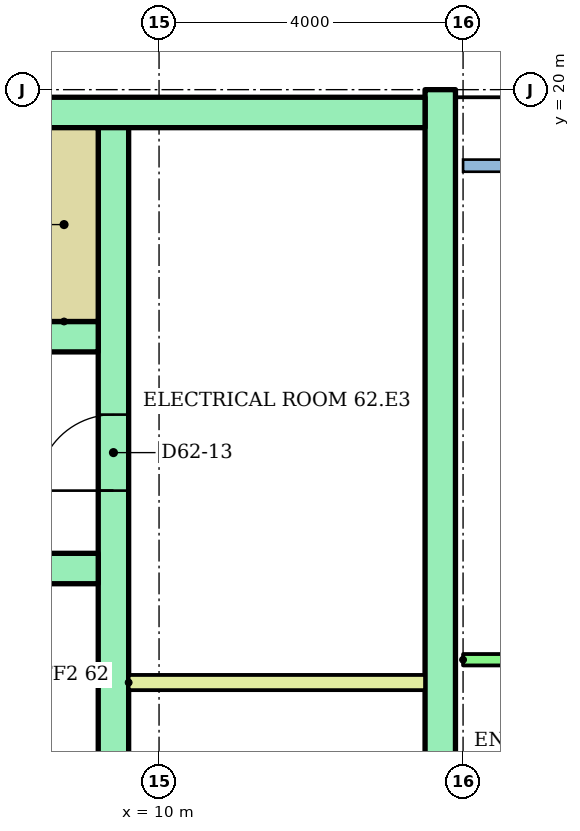
"""IFC4 building model, lengths in metres.
Left out: names, types, materials, properties, quantities, classifications, styles, units other than length and angle.
Written with IfcOpenShell. Run it as: python <this file> out.ifc"""

import sys

from ifc_helpers import new_model, si_unit, direction, frame, frame_2d, origin, place, context, subcontext, project, spatial, rectangle, extrude, element, fill, save


model = new_model("IFC4")
c1 = context("Model", 3, precision=1e-05, world=origin(), true_north=direction((0.0, 1.0)))
c2 = subcontext(c1, "Body", "Model", "MODEL_VIEW")
j1 = project(units=[si_unit("LENGTHUNIT", "METRE"), si_unit("PLANEANGLEUNIT", "RADIAN")], contexts=[c1])
p1 = place(None, origin())
s1 = spatial("IfcSite", under=j1, at=p1, CompositionType="ELEMENT")
p2 = place(p1, origin())
s2 = spatial("IfcBuilding", under=s1, at=p2, CompositionType="ELEMENT")
p3 = place(p2, frame((0.0, 0.0, 236.4)))
s3 = spatial("IfcBuildingStorey", under=s2, at=p3, CompositionType="ELEMENT", Elevation=236.4)
p4 = place(p3, frame((13.7, 3.0, 0.0), z_axis=(0.0, 0.0, 1.0), x_axis=(0.0, 1.0, 0.0)))
e1 = element("IfcWall", 1, at=p4, inside=s3, PredefinedType="SHEAR", context=c2, shape_type="SweptSolid", body=[
    extrude(rectangle(XDim=17.0, YDim=0.4, at=frame_2d((8.5, 0.0))), origin(), (0.0, 0.0, 1.0), 2.8),
])
p5 = place(p3, frame((-13.5, 19.7, 0.0)))
e2 = element("IfcWall", 2, at=p5, inside=s3, PredefinedType="SHEAR", context=c2, shape_type="SweptSolid", body=[
    extrude(rectangle(XDim=27.0, YDim=0.4, at=frame_2d((13.5, 0.0))), origin(), (0.0, 0.0, 1.0), 2.8),
])
p6 = place(p3, frame((9.4, 6.8, 0.0), z_axis=(0.0, 0.0, 1.0), x_axis=(0.0, 1.0, 0.0)))
e3 = element("IfcWall", 3, at=p6, inside=s3, PredefinedType="SHEAR", context=c2, shape_type="SweptSolid", body=[
    extrude(rectangle(XDim=12.7, YDim=0.4, at=frame_2d((6.35, 0.0))), origin(), (0.0, 0.0, 1.0), 2.8),
])
p7 = place(p6, frame((0.3, 0.0, 0.0)))
e4 = element("IfcOpeningElement", 4, at=p7, cuts=e3, PredefinedType="OPENING", context=c2, shape_type="SweptSolid", body=[
    extrude(rectangle(XDim=1.0, YDim=2.1, at=frame_2d((0.5, 1.05))), frame((0.0, 0.21, 0.0), z_axis=(0.0, -1.0, 0.0), x_axis=(1.0, 0.0, 0.0)), (0.0, 0.0, 1.0), 0.42),
])
p8 = place(p6, frame((2.05, 0.0, 0.0)))
e5 = element("IfcOpeningElement", 5, at=p8, cuts=e3, PredefinedType="OPENING", context=c2, shape_type="SweptSolid", body=[
    extrude(rectangle(XDim=1.0, YDim=2.1, at=frame_2d((0.5, 1.05))), frame((0.0, 0.21, 0.0), z_axis=(0.0, -1.0, 0.0), x_axis=(1.0, 0.0, 0.0)), (0.0, 0.0, 1.0), 0.42),
])
p9 = place(p6, frame((7.925, 0.0, 0.0)))
e6 = element("IfcOpeningElement", 6, at=p9, cuts=e3, PredefinedType="OPENING", context=c2, shape_type="SweptSolid", body=[
    extrude(rectangle(XDim=1.0, YDim=2.1, at=frame_2d((0.5, 1.05))), frame((0.0, 0.21, 0.0), z_axis=(0.0, -1.0, 0.0), x_axis=(1.0, 0.0, 0.0)), (0.0, 0.0, 1.0), 0.42),
])
p10 = place(p3, frame((1.2, 13.7, 0.0)))
e7 = element("IfcWall", 7, at=p10, inside=s3, PredefinedType="SHEAR", context=c2, shape_type="SweptSolid", body=[
    extrude(rectangle(XDim=8.0, YDim=0.4, at=frame_2d((4.0, 0.0))), origin(), (0.0, 0.0, 1.0), 2.8),
])
p11 = place(p3, frame((-9.2, 16.75, 0.0)))
e8 = element("IfcWall", 8, at=p11, inside=s3, PredefinedType="SHEAR", context=c2, shape_type="SweptSolid", body=[
    extrude(rectangle(XDim=18.4, YDim=0.4, at=frame_2d((9.2, 0.0))), origin(), (0.0, 0.0, 1.0), 2.8),
])
p12 = place(p11, frame((0.1, 0.0, 0.0)))
e9 = element("IfcOpeningElement", 9, at=p12, cuts=e8, PredefinedType="OPENING", context=c2, shape_type="SweptSolid", body=[
    extrude(rectangle(XDim=0.95, YDim=2.1, at=frame_2d((0.475, 1.05))), frame((0.0, 0.21, 0.0), z_axis=(0.0, -1.0, 0.0), x_axis=(1.0, 0.0, 0.0)), (0.0, 0.0, 1.0), 0.42),
])
p13 = place(p11, frame((6.1, 0.0, 0.0)))
e10 = element("IfcOpeningElement", 10, at=p13, cuts=e8, PredefinedType="OPENING", context=c2, shape_type="SweptSolid", body=[
    extrude(rectangle(XDim=0.95, YDim=2.1, at=frame_2d((0.475, 1.05))), frame((0.0, 0.21, 0.0), z_axis=(0.0, -1.0, 0.0), x_axis=(1.0, 0.0, 0.0)), (0.0, 0.0, 1.0), 0.42),
])
p14 = place(p11, frame((12.1, 0.0, 0.0)))
e11 = element("IfcOpeningElement", 11, at=p14, cuts=e8, PredefinedType="OPENING", context=c2, shape_type="SweptSolid", body=[
    extrude(rectangle(XDim=0.95, YDim=2.1, at=frame_2d((0.475, 1.05))), frame((0.0, 0.21, 0.0), z_axis=(0.0, -1.0, 0.0), x_axis=(1.0, 0.0, 0.0)), (0.0, 0.0, 1.0), 0.42),
])
p15 = place(p3, frame((8.75, 16.95, 0.0), z_axis=(0.0, 0.0, 1.0), x_axis=(0.0, 1.0, 0.0)))
e12 = element("IfcWall", 12, at=p15, inside=s3, PredefinedType="SHEAR", context=c2, shape_type="SweptSolid", body=[
    extrude(rectangle(XDim=2.55, YDim=0.9, at=frame_2d((1.275, 0.0))), origin(), (0.0, 0.0, 1.0), 2.8),
])
p16 = place(p3, frame((9.6, 12.2, 0.0)))
e13 = element("IfcWall", 13, at=p16, inside=s3, PredefinedType="PARTITIONING", context=c2, shape_type="SweptSolid", body=[
    extrude(rectangle(XDim=3.9, YDim=0.2, at=frame_2d((1.95, 0.0))), origin(), (0.0, 0.0, 1.0), 2.8),
])
p17 = place(p3, frame((14.0, 12.5, 0.0)))
e14 = element("IfcWall", 14, at=p17, inside=s3, PredefinedType="PARTITIONING", context=c2, shape_type="SweptSolid", body=[
    extrude(rectangle(XDim=14.92, YDim=0.15, at=frame_2d((7.46, 0.0))), origin(), (0.0, 0.0, 1.0), 2.4),
])
p18 = place(p17, frame((4.6, 0.0, 0.0)))
e15 = element("IfcOpeningElement", 15, at=p18, cuts=e14, PredefinedType="OPENING", context=c2, shape_type="SweptSolid", body=[
    extrude(rectangle(XDim=1.0, YDim=2.1, at=frame_2d((0.5, 1.05))), frame((0.0, 0.085, 0.0), z_axis=(0.0, -1.0, 0.0), x_axis=(1.0, 0.0, 0.0)), (0.0, 0.0, 1.0), 0.17),
])
p19 = place(p17, frame((12.476, 0.0, 0.0)))
e16 = element("IfcOpeningElement", 16, at=p19, cuts=e14, PredefinedType="OPENING", context=c2, shape_type="SweptSolid", body=[
    extrude(rectangle(XDim=0.9, YDim=2.1, at=frame_2d((0.45, 1.05))), frame((0.0, 0.085, 0.0), z_axis=(0.0, -1.0, 0.0), x_axis=(1.0, 0.0, 0.0)), (0.0, 0.0, 1.0), 0.17),
])
p20 = place(p9, origin())
e17 = element("IfcDoor", 17, at=p20, inside=s3, OperationType="SINGLE_SWING_LEFT", PredefinedType="DOOR", context=c2, shape_type="SweptSolid", body=[
    extrude(rectangle(XDim=1.0, YDim=2.1, at=frame_2d((0.5, 1.05))), frame((0.0, 0.025, 0.0), z_axis=(0.0, -1.0, 0.0), x_axis=(1.0, 0.0, 0.0)), (0.0, 0.0, 1.0), 0.05),
])
fill(e6, e17)
save(model, sys.argv[1])
